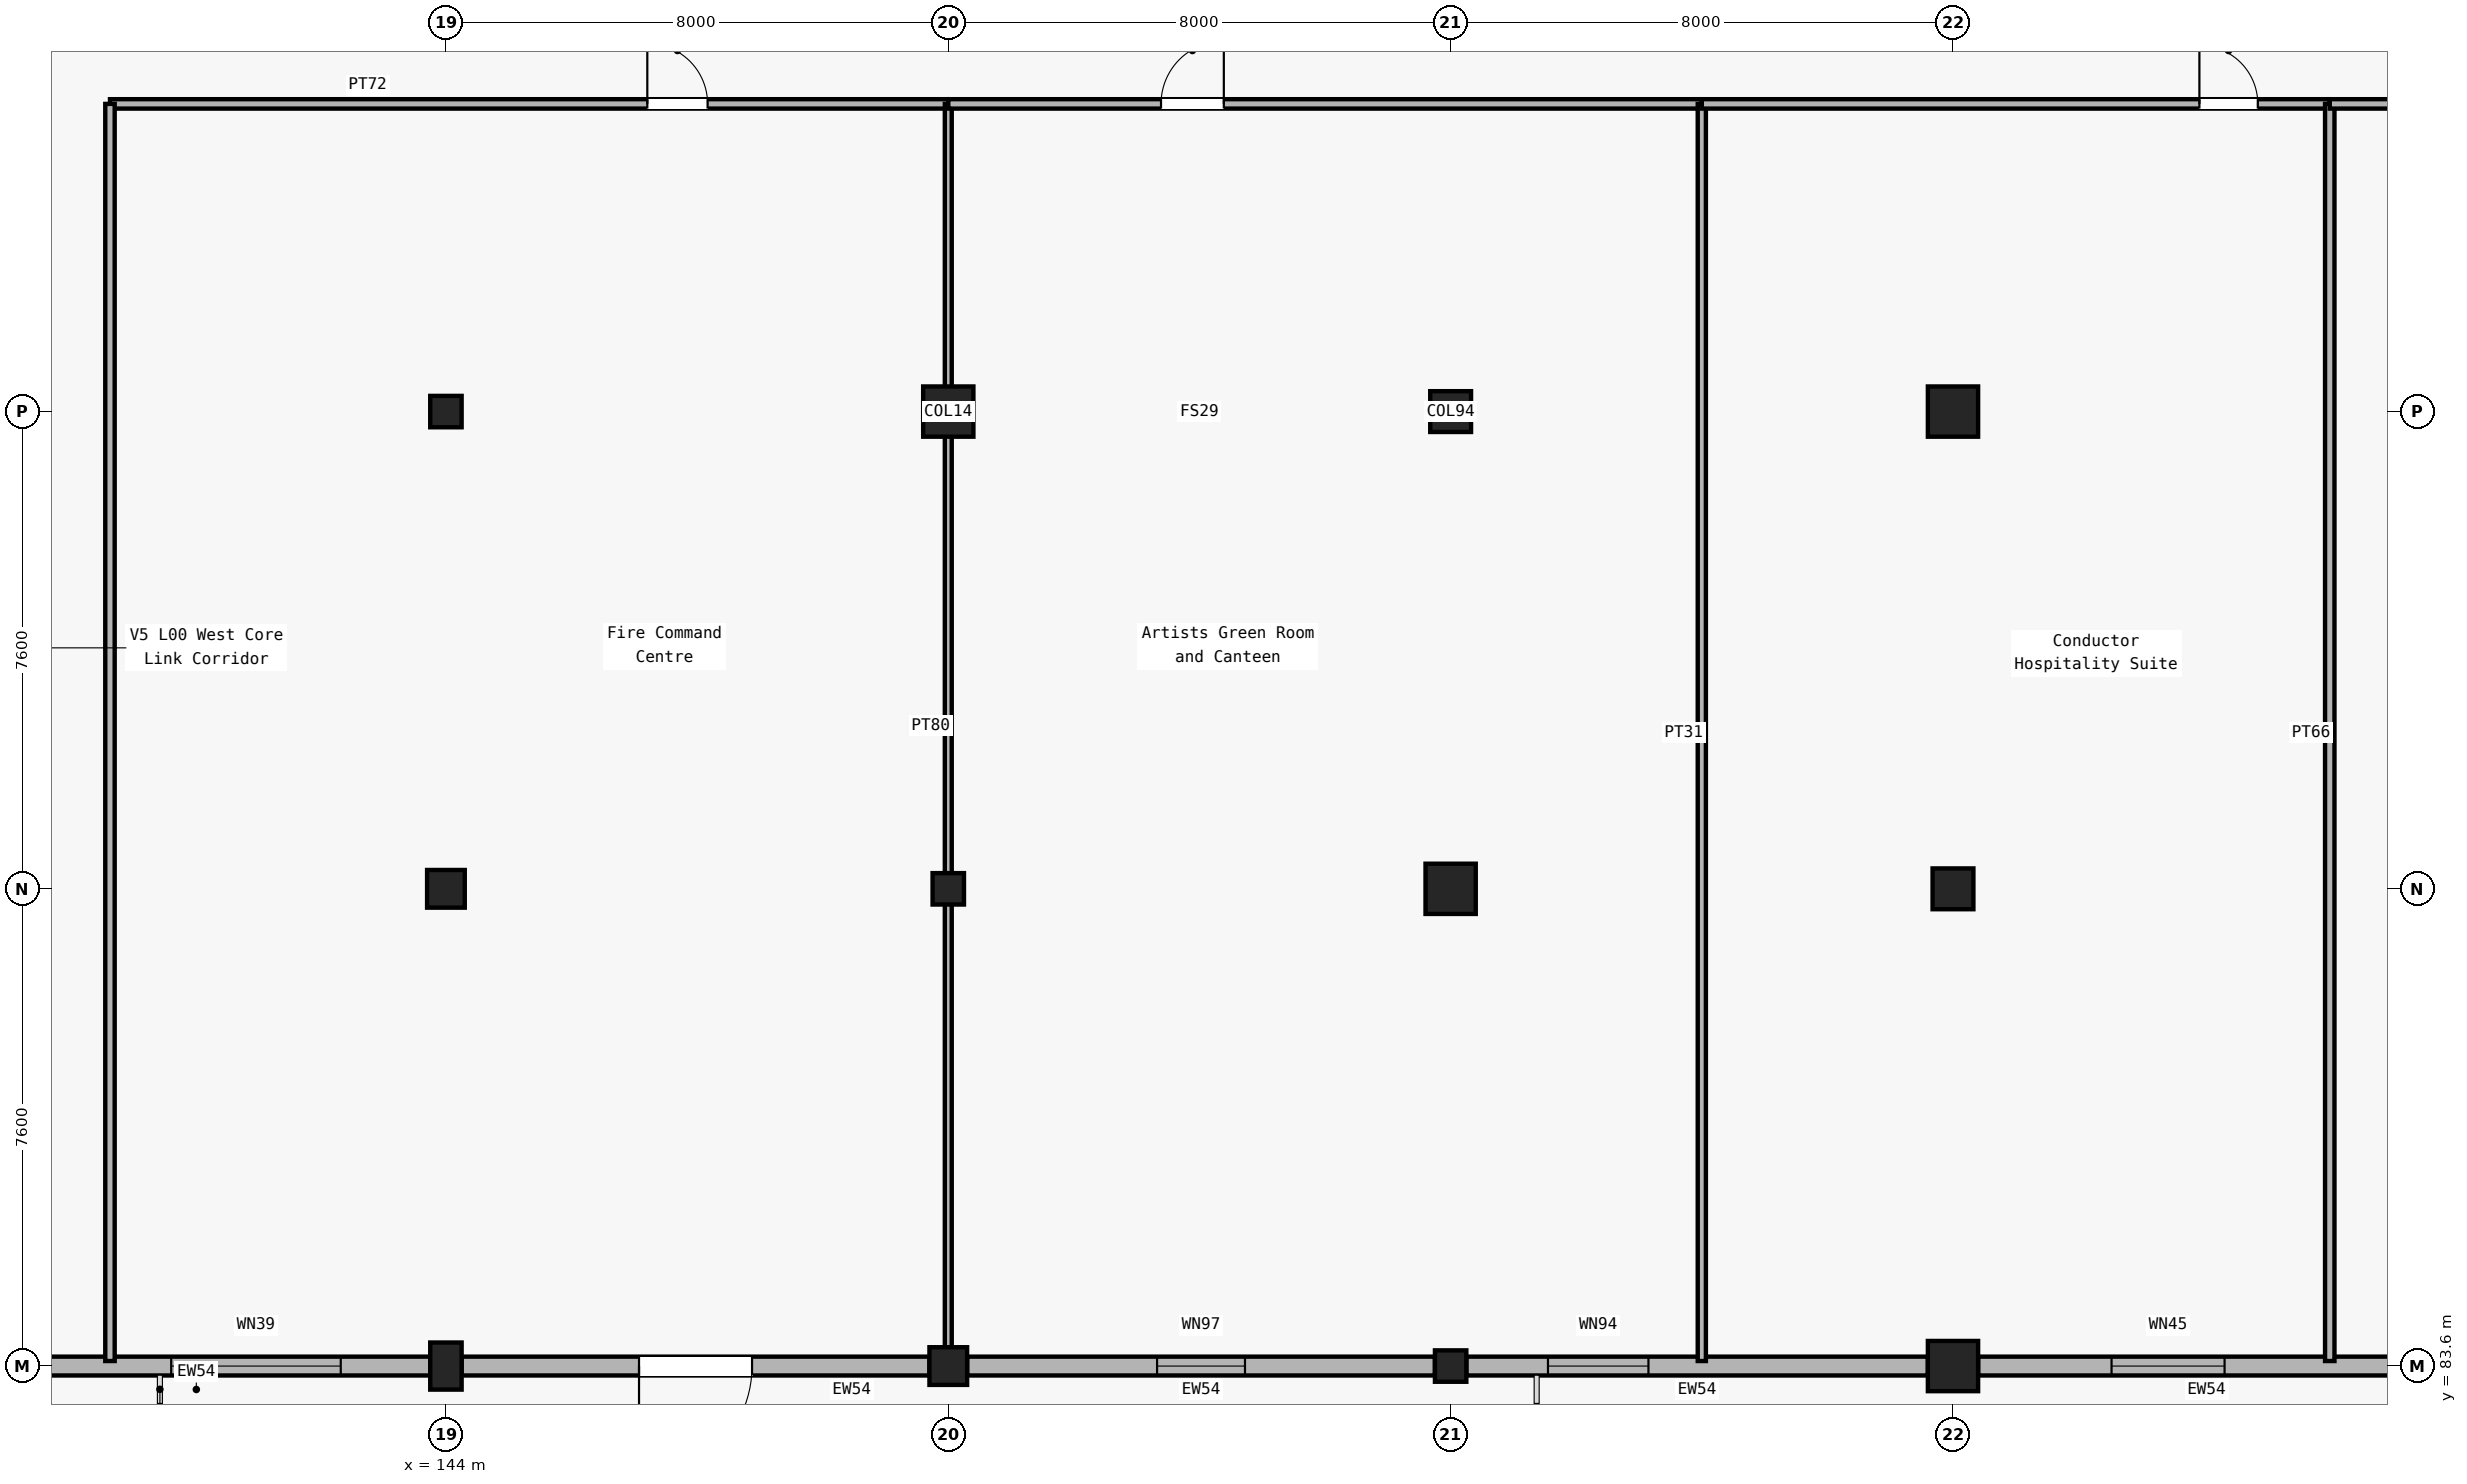
"""IFC4 building model, lengths in metres.
Left out: names, types, materials, properties, quantities, classifications, styles, units other than length and angle.
Written with IfcOpenShell. Run it as: python <this file> out.ifc"""

import sys

from ifc_helpers import new_model, si_unit, direction, frame, frame_2d, origin, origin_2d, place, context, subcontext, project, spatial, rectangle, circle, extrude, element, fill, save


model = new_model("IFC4")
c1 = context("Model", 3, precision=1e-05, world=origin(), true_north=direction((0.0, 1.0)))
c2 = subcontext(c1, "Body", "Model", "MODEL_VIEW")
j1 = project(units=[si_unit("LENGTHUNIT", "METRE"), si_unit("PLANEANGLEUNIT", "RADIAN")], contexts=[c1])
p1 = place(None, origin())
s1 = spatial("IfcSite", under=j1, at=p1, CompositionType="ELEMENT")
p2 = place(p1, origin())
s2 = spatial("IfcBuilding", under=s1, at=p2, CompositionType="ELEMENT")
p3 = place(p2, origin())
s3 = spatial("IfcBuildingStorey", under=s2, at=p3, CompositionType="ELEMENT", Elevation=0.0)
p4 = place(p3, frame((144.0, 83.6, 0.0), z_axis=(0.0, 0.0, 1.0), x_axis=(1.0, 0.0, 0.0)))
e1 = element("IfcColumn", 1, at=p4, inside=s3, PredefinedType="COLUMN", context=c2, shape_type="SweptSolid", body=[
    extrude(rectangle(XDim=0.5, YDim=0.75, at=origin_2d()), origin(), (0.0, 0.0, 1.0), 5.4),
])
p5 = place(p3, frame((144.0, 91.2, 0.0), z_axis=(0.0, 0.0, 1.0), x_axis=(1.0, 0.0, 0.0)))
e2 = element("IfcColumn", 2, at=p5, inside=s3, PredefinedType="COLUMN", context=c2, shape_type="SweptSolid", body=[
    extrude(rectangle(XDim=0.6, YDim=0.6, at=origin_2d()), origin(), (0.0, 0.0, 1.0), 5.4),
])
p6 = place(p3, frame((144.0, 98.8, 0.0), z_axis=(0.0, 0.0, 1.0), x_axis=(1.0, 0.0, 0.0)))
e3 = element("IfcColumn", 3, at=p6, inside=s3, PredefinedType="COLUMN", context=c2, shape_type="SweptSolid", body=[
    extrude(rectangle(XDim=0.5, YDim=0.5, at=origin_2d()), origin(), (0.0, 0.0, 1.0), 5.4),
])
p7 = place(p3, frame((152.0, 83.6, 0.0), z_axis=(0.0, 0.0, 1.0), x_axis=(1.0, 0.0, 0.0)))
e4 = element("IfcColumn", 4, at=p7, inside=s3, PredefinedType="COLUMN", context=c2, shape_type="SweptSolid", body=[
    extrude(rectangle(XDim=0.6, YDim=0.6, at=origin_2d()), origin(), (0.0, 0.0, 1.0), 5.4),
])
p8 = place(p3, frame((152.0, 91.2, 0.0), z_axis=(0.0, 0.0, 1.0), x_axis=(1.0, 0.0, 0.0)))
e5 = element("IfcColumn", 5, at=p8, inside=s3, PredefinedType="COLUMN", context=c2, shape_type="SweptSolid", body=[
    extrude(rectangle(XDim=0.5, YDim=0.5, at=origin_2d()), origin(), (0.0, 0.0, 1.0), 5.4),
])
p9 = place(p3, frame((152.0, 98.8, 0.0), z_axis=(0.0, 0.0, 1.0), x_axis=(1.0, 0.0, 0.0)))
e6 = element("IfcColumn", 6, at=p9, inside=s3, PredefinedType="COLUMN", context=c2, shape_type="SweptSolid", body=[
    extrude(circle(Radius=0.4, at=origin_2d()), origin(), (0.0, 0.0, 1.0), 5.4),
])
p10 = place(p3, frame((160.0, 83.6, 0.0), z_axis=(0.0, 0.0, 1.0), x_axis=(1.0, 0.0, 0.0)))
e7 = element("IfcColumn", 7, at=p10, inside=s3, PredefinedType="COLUMN", context=c2, shape_type="SweptSolid", body=[
    extrude(rectangle(XDim=0.5, YDim=0.5, at=origin_2d()), origin(), (0.0, 0.0, 1.0), 5.4),
])
p11 = place(p3, frame((160.0, 91.2, 0.0), z_axis=(0.0, 0.0, 1.0), x_axis=(1.0, 0.0, 0.0)))
e8 = element("IfcColumn", 8, at=p11, inside=s3, PredefinedType="COLUMN", context=c2, shape_type="SweptSolid", body=[
    extrude(circle(Radius=0.4, at=origin_2d()), origin(), (0.0, 0.0, 1.0), 5.4),
])
p12 = place(p3, frame((160.0, 98.8, 0.0), z_axis=(0.0, 0.0, 1.0), x_axis=(1.0, 0.0, 0.0)))
e9 = element("IfcColumn", 9, at=p12, inside=s3, PredefinedType="COLUMN", context=c2, shape_type="SweptSolid", body=[
    extrude(circle(Radius=0.325, at=origin_2d()), origin(), (0.0, 0.0, 1.0), 5.4),
])
p13 = place(p3, frame((168.0, 83.6, 0.0), z_axis=(0.0, 0.0, 1.0), x_axis=(1.0, 0.0, 0.0)))
e10 = element("IfcColumn", 10, at=p13, inside=s3, PredefinedType="COLUMN", context=c2, shape_type="SweptSolid", body=[
    extrude(circle(Radius=0.4, at=origin_2d()), origin(), (0.0, 0.0, 1.0), 5.4),
])
p14 = place(p3, frame((168.0, 91.2, 0.0), z_axis=(0.0, 0.0, 1.0), x_axis=(1.0, 0.0, 0.0)))
e11 = element("IfcColumn", 11, at=p14, inside=s3, PredefinedType="COLUMN", context=c2, shape_type="SweptSolid", body=[
    extrude(circle(Radius=0.325, at=origin_2d()), origin(), (0.0, 0.0, 1.0), 5.4),
])
p15 = place(p3, frame((168.0, 98.8, 0.0), z_axis=(0.0, 0.0, 1.0), x_axis=(1.0, 0.0, 0.0)))
e12 = element("IfcColumn", 12, at=p15, inside=s3, PredefinedType="COLUMN", context=c2, shape_type="SweptSolid", body=[
    extrude(rectangle(XDim=0.8, YDim=0.8, at=origin_2d()), origin(), (0.0, 0.0, 1.0), 5.4),
])
p16 = place(p3, frame((143.75, 83.6, 0.0), z_axis=(0.0, 0.0, 1.0), x_axis=(-1.0, 0.0, 0.0)))
e13 = element("IfcWall", 13, at=p16, inside=s3, PredefinedType="SOLIDWALL", context=c2, shape_type="SweptSolid", body=[
    extrude(rectangle(XDim=7.45, YDim=0.3, at=frame_2d((3.725, 0.0))), origin(), (0.0, 0.0, 1.0), 4.49),
])
p17 = place(p16, frame((1.425, 0.0, 0.95)))
e14 = element("IfcOpeningElement", 14, at=p17, cuts=e13, PredefinedType="OPENING", context=c2, shape_type="SweptSolid", body=[
    extrude(rectangle(XDim=2.7, YDim=1.8, at=frame_2d((1.35, 0.9))), frame((0.0, 0.16, 0.0), z_axis=(0.0, -1.0, 0.0), x_axis=(1.0, 0.0, 0.0)), (0.0, 0.0, 1.0), 0.32),
])
p18 = place(p3, frame((151.7, 83.6, 0.0), z_axis=(0.0, 0.0, 1.0), x_axis=(-1.0, 0.0, 0.0)))
e15 = element("IfcWall", 15, at=p18, inside=s3, PredefinedType="SOLIDWALL", context=c2, shape_type="SweptSolid", body=[
    extrude(rectangle(XDim=7.45, YDim=0.3, at=frame_2d((3.725, 0.0))), origin(), (0.0, 0.0, 1.0), 4.44),
])
p19 = place(p18, frame((2.825, 0.0, 0.0)))
e16 = element("IfcOpeningElement", 16, at=p19, cuts=e15, PredefinedType="OPENING", context=c2, shape_type="SweptSolid", body=[
    extrude(rectangle(XDim=1.8, YDim=2.2, at=frame_2d((0.9, 1.1))), frame((0.0, 0.16, 0.0), z_axis=(0.0, -1.0, 0.0), x_axis=(1.0, 0.0, 0.0)), (0.0, 0.0, 1.0), 0.32),
])
p20 = place(p3, frame((159.75, 83.6, 0.0), z_axis=(0.0, 0.0, 1.0), x_axis=(-1.0, 0.0, 0.0)))
e17 = element("IfcWall", 17, at=p20, inside=s3, PredefinedType="SOLIDWALL", context=c2, shape_type="SweptSolid", body=[
    extrude(rectangle(XDim=7.45, YDim=0.3, at=frame_2d((3.725, 0.0))), origin(), (0.0, 0.0, 1.0), 4.44),
])
p21 = place(p20, frame((3.025, 0.0, 0.95)))
e18 = element("IfcOpeningElement", 18, at=p21, cuts=e17, PredefinedType="OPENING", context=c2, shape_type="SweptSolid", body=[
    extrude(rectangle(XDim=1.4, YDim=1.95, at=frame_2d((0.7, 0.975))), frame((0.0, 0.16, 0.0), z_axis=(0.0, -1.0, 0.0), x_axis=(1.0, 0.0, 0.0)), (0.0, 0.0, 1.0), 0.32),
])
p22 = place(p3, frame((167.6, 83.6, 0.0), z_axis=(0.0, 0.0, 1.0), x_axis=(-1.0, 0.0, 0.0)))
e19 = element("IfcWall", 19, at=p22, inside=s3, PredefinedType="SOLIDWALL", context=c2, shape_type="SweptSolid", body=[
    extrude(rectangle(XDim=7.35, YDim=0.3, at=frame_2d((3.675, 0.0))), origin(), (0.0, 0.0, 1.0), 4.44),
])
p23 = place(p22, frame((4.45, 0.0, 0.95)))
e20 = element("IfcOpeningElement", 20, at=p23, cuts=e19, PredefinedType="OPENING", context=c2, shape_type="SweptSolid", body=[
    extrude(rectangle(XDim=1.6, YDim=1.95, at=frame_2d((0.8, 0.975))), frame((0.0, 0.16, 0.0), z_axis=(0.0, -1.0, 0.0), x_axis=(1.0, 0.0, 0.0)), (0.0, 0.0, 1.0), 0.32),
])
p24 = place(p3, frame((175.675, 83.6, 0.0), z_axis=(0.0, 0.0, 1.0), x_axis=(-1.0, 0.0, 0.0)))
e21 = element("IfcWall", 21, at=p24, inside=s3, PredefinedType="SOLIDWALL", context=c2, shape_type="SweptSolid", body=[
    extrude(rectangle(XDim=7.275, YDim=0.3, at=frame_2d((3.638, 0.0))), origin(), (0.0, 0.0, 1.0), 4.49),
])
p25 = place(p24, frame((3.35, 0.0, 0.95)))
e22 = element("IfcOpeningElement", 22, at=p25, cuts=e21, PredefinedType="OPENING", context=c2, shape_type="SweptSolid", body=[
    extrude(rectangle(XDim=1.8, YDim=1.95, at=frame_2d((0.9, 0.975))), frame((0.0, 0.16, 0.0), z_axis=(0.0, -1.0, 0.0), x_axis=(1.0, 0.0, 0.0)), (0.0, 0.0, 1.0), 0.32),
])
p26 = place(p3, frame((138.65, 103.7, 0.0), z_axis=(0.0, 0.0, 1.0), x_axis=(1.0, 0.0, 0.0)))
e23 = element("IfcWall", 23, at=p26, inside=s3, PredefinedType="PARTITIONING", context=c2, shape_type="SweptSolid", body=[
    extrude(rectangle(XDim=13.35, YDim=0.15, at=frame_2d((6.675, 0.0))), origin(), (0.0, 0.0, 1.0), 4.275),
])
p27 = place(p26, frame((8.557, 0.0, 0.0)))
e24 = element("IfcOpeningElement", 24, at=p27, cuts=e23, PredefinedType="OPENING", context=c2, shape_type="SweptSolid", body=[
    extrude(rectangle(XDim=0.96, YDim=2.05, at=frame_2d((0.48, 1.025))), frame((0.0, 0.085, 0.0), z_axis=(0.0, -1.0, 0.0), x_axis=(1.0, 0.0, 0.0)), (0.0, 0.0, 1.0), 0.17),
])
p28 = place(p3, frame((152.0, 83.9, 0.0), z_axis=(0.0, 0.0, 1.0), x_axis=(0.0, 1.0, 0.0)))
e25 = element("IfcWall", 25, at=p28, inside=s3, PredefinedType="PARTITIONING", context=c2, shape_type="SweptSolid", body=[
    extrude(rectangle(XDim=19.8, YDim=0.11, at=frame_2d((9.9, 0.0))), origin(), (0.0, 0.0, 1.0), 4.14),
])
p29 = place(p3, frame((152.0, 103.7, 0.0), z_axis=(0.0, 0.0, 1.0), x_axis=(1.0, 0.0, 0.0)))
e26 = element("IfcWall", 26, at=p29, inside=s3, PredefinedType="PARTITIONING", context=c2, shape_type="SweptSolid", body=[
    extrude(rectangle(XDim=12.0, YDim=0.15, at=frame_2d((6.0, 0.0))), origin(), (0.0, 0.0, 1.0), 4.275),
])
p30 = place(p29, frame((3.388, 0.0, 0.0)))
e27 = element("IfcOpeningElement", 27, at=p30, cuts=e26, PredefinedType="OPENING", context=c2, shape_type="SweptSolid", body=[
    extrude(rectangle(XDim=1.0, YDim=2.05, at=frame_2d((0.5, 1.025))), frame((0.0, 0.085, 0.0), z_axis=(0.0, -1.0, 0.0), x_axis=(1.0, 0.0, 0.0)), (0.0, 0.0, 1.0), 0.17),
])
p31 = place(p3, frame((164.0, 83.68, 0.0), z_axis=(0.0, 0.0, 1.0), x_axis=(0.0, 1.0, 0.0)))
e28 = element("IfcWall", 28, at=p31, inside=s3, PredefinedType="PARTITIONING", context=c2, shape_type="SweptSolid", body=[
    extrude(rectangle(XDim=20.02, YDim=0.13, at=frame_2d((10.01, 0.0))), origin(), (0.0, 0.0, 1.0), 4.275),
])
p32 = place(p3, frame((164.0, 103.7, 0.0), z_axis=(0.0, 0.0, 1.0), x_axis=(1.0, 0.0, 0.0)))
e29 = element("IfcWall", 29, at=p32, inside=s3, PredefinedType="PARTITIONING", context=c2, shape_type="SweptSolid", body=[
    extrude(rectangle(XDim=10.0, YDim=0.15, at=frame_2d((5.0, 0.0))), origin(), (0.0, 0.0, 1.0), 4.425),
])
p33 = place(p32, frame((7.924, 0.0, 0.0)))
e30 = element("IfcOpeningElement", 30, at=p33, cuts=e29, PredefinedType="OPENING", context=c2, shape_type="SweptSolid", body=[
    extrude(rectangle(XDim=0.93, YDim=2.1, at=frame_2d((0.465, 1.05))), frame((0.0, 0.085, 0.0), z_axis=(0.0, -1.0, 0.0), x_axis=(1.0, 0.0, 0.0)), (0.0, 0.0, 1.0), 0.17),
])
p34 = place(p3, frame((174.0, 83.68, 0.0), z_axis=(0.0, 0.0, 1.0), x_axis=(0.0, 1.0, 0.0)))
e31 = element("IfcWall", 31, at=p34, inside=s3, PredefinedType="PARTITIONING", context=c2, shape_type="SweptSolid", body=[
    extrude(rectangle(XDim=20.02, YDim=0.15, at=frame_2d((10.01, 0.0))), origin(), (0.0, 0.0, 1.0), 4.425),
])
p35 = place(p3, frame((174.0, 103.7, 0.0), z_axis=(0.0, 0.0, 1.0), x_axis=(1.0, 0.0, 0.0)))
e32 = element("IfcWall", 32, at=p35, inside=s3, PredefinedType="PARTITIONING", context=c2, shape_type="SweptSolid", body=[
    extrude(rectangle(XDim=9.92, YDim=0.15, at=frame_2d((4.96, 0.0))), origin(), (0.0, 0.0, 1.0), 4.35),
])
p36 = place(p35, frame((5.308, 0.0, 0.0)))
e33 = element("IfcOpeningElement", 33, at=p36, cuts=e32, PredefinedType="OPENING", context=c2, shape_type="SweptSolid", body=[
    extrude(rectangle(XDim=0.99, YDim=2.1, at=frame_2d((0.495, 1.05))), frame((0.0, 0.085, 0.0), z_axis=(0.0, -1.0, 0.0), x_axis=(1.0, 0.0, 0.0)), (0.0, 0.0, 1.0), 0.17),
])
p37 = place(p3, frame((138.65, 83.68, 0.0), z_axis=(0.0, 0.0, 1.0), x_axis=(0.0, 1.0, 0.0)))
e34 = element("IfcWall", 34, at=p37, inside=s3, PredefinedType="PARTITIONING", context=c2, shape_type="SweptSolid", body=[
    extrude(rectangle(XDim=20.02, YDim=0.15, at=frame_2d((10.01, 0.0))), origin(), (0.0, 0.0, 1.0), 4.43),
])
p38 = place(p17, origin())
e35 = element("IfcWindow", 35, at=p38, inside=s3, PartitioningType="DOUBLE_PANEL_VERTICAL", PredefinedType="WINDOW", context=c2, shape_type="SweptSolid", body=[
    extrude(rectangle(XDim=2.7, YDim=1.8, at=frame_2d((1.35, 0.9))), frame((0.0, 0.03, 0.0), z_axis=(0.0, -1.0, 0.0), x_axis=(1.0, 0.0, 0.0)), (0.0, 0.0, 1.0), 0.06),
])
fill(e14, e35)
p39 = place(p19, origin())
e36 = element("IfcDoor", 36, at=p39, inside=s3, OperationType="SINGLE_SWING_RIGHT", PredefinedType="DOOR", context=c2, shape_type="SweptSolid", body=[
    extrude(rectangle(XDim=1.8, YDim=2.2, at=frame_2d((0.9, 1.1))), frame((0.0, 0.025, 0.0), z_axis=(0.0, -1.0, 0.0), x_axis=(1.0, 0.0, 0.0)), (0.0, 0.0, 1.0), 0.05),
])
fill(e16, e36)
p40 = place(p21, origin())
e37 = element("IfcWindow", 37, at=p40, inside=s3, PartitioningType="SINGLE_PANEL", PredefinedType="WINDOW", context=c2, shape_type="SweptSolid", body=[
    extrude(rectangle(XDim=1.4, YDim=1.95, at=frame_2d((0.7, 0.975))), frame((0.0, 0.03, 0.0), z_axis=(0.0, -1.0, 0.0), x_axis=(1.0, 0.0, 0.0)), (0.0, 0.0, 1.0), 0.06),
])
fill(e18, e37)
p41 = place(p23, origin())
e38 = element("IfcWindow", 38, at=p41, inside=s3, PartitioningType="SINGLE_PANEL", PredefinedType="WINDOW", context=c2, shape_type="SweptSolid", body=[
    extrude(rectangle(XDim=1.6, YDim=1.95, at=frame_2d((0.8, 0.975))), frame((0.0, 0.03, 0.0), z_axis=(0.0, -1.0, 0.0), x_axis=(1.0, 0.0, 0.0)), (0.0, 0.0, 1.0), 0.06),
])
fill(e20, e38)
p42 = place(p25, origin())
e39 = element("IfcWindow", 39, at=p42, inside=s3, PartitioningType="DOUBLE_PANEL_VERTICAL", PredefinedType="WINDOW", context=c2, shape_type="SweptSolid", body=[
    extrude(rectangle(XDim=1.8, YDim=1.95, at=frame_2d((0.9, 0.975))), frame((0.0, 0.03, 0.0), z_axis=(0.0, -1.0, 0.0), x_axis=(1.0, 0.0, 0.0)), (0.0, 0.0, 1.0), 0.06),
])
fill(e22, e39)
p43 = place(p27, origin())
e40 = element("IfcDoor", 40, at=p43, inside=s3, OperationType="SINGLE_SWING_LEFT", PredefinedType="DOOR", context=c2, shape_type="SweptSolid", body=[
    extrude(rectangle(XDim=0.96, YDim=2.05, at=frame_2d((0.48, 1.025))), frame((0.0, 0.025, 0.0), z_axis=(0.0, -1.0, 0.0), x_axis=(1.0, 0.0, 0.0)), (0.0, 0.0, 1.0), 0.05),
])
fill(e24, e40)
p44 = place(p30, origin())
e41 = element("IfcDoor", 41, at=p44, inside=s3, OperationType="SINGLE_SWING_RIGHT", PredefinedType="DOOR", context=c2, shape_type="SweptSolid", body=[
    extrude(rectangle(XDim=1.0, YDim=2.05, at=frame_2d((0.5, 1.025))), frame((0.0, 0.025, 0.0), z_axis=(0.0, -1.0, 0.0), x_axis=(1.0, 0.0, 0.0)), (0.0, 0.0, 1.0), 0.05),
])
fill(e27, e41)
p45 = place(p33, origin())
e42 = element("IfcDoor", 42, at=p45, inside=s3, OperationType="SINGLE_SWING_LEFT", PredefinedType="DOOR", context=c2, shape_type="SweptSolid", body=[
    extrude(rectangle(XDim=0.93, YDim=2.1, at=frame_2d((0.465, 1.05))), frame((0.0, 0.025, 0.0), z_axis=(0.0, -1.0, 0.0), x_axis=(1.0, 0.0, 0.0)), (0.0, 0.0, 1.0), 0.05),
])
fill(e30, e42)
save(model, sys.argv[1])
